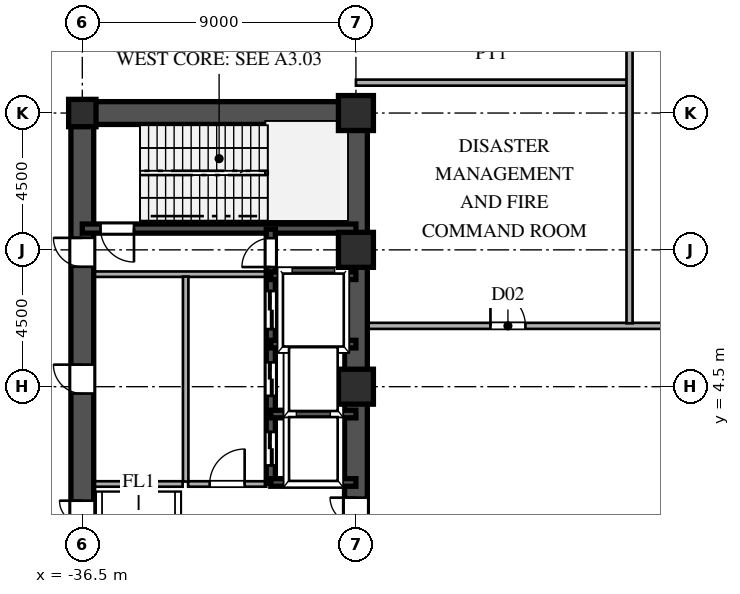
"""IFC4 building model, lengths in metres.
Left out: names, types, materials, properties, quantities, classifications, styles, units other than length and angle.
Written with IfcOpenShell. Run it as: python <this file> out.ifc"""

import sys

from ifc_helpers import new_model, si_unit, direction, frame, frame_2d, origin, origin_2d, place, context, subcontext, project, spatial, rectangle, hollow_rectangle, i_section, extrude, source, transform, mapped, element, fill, save


model = new_model("IFC4")
c1 = context("Model", 3, precision=1e-05, world=origin(), true_north=direction((0.0, 1.0)))
c2 = subcontext(c1, "Body", "Model", "MODEL_VIEW")
j1 = project(units=[si_unit("LENGTHUNIT", "METRE"), si_unit("PLANEANGLEUNIT", "RADIAN")], contexts=[c1])
p1 = place(None, origin())
s1 = spatial("IfcSite", under=j1, at=p1, CompositionType="ELEMENT")
p2 = place(p1, origin())
s2 = spatial("IfcBuilding", under=s1, at=p2, CompositionType="ELEMENT")
p3 = place(p2, origin())
s3 = spatial("IfcBuildingStorey", under=s2, at=p3, CompositionType="ELEMENT", Elevation=0.0)
m1 = source(origin(), c2, "Body", "SweptSolid", [
    extrude(hollow_rectangle(XDim=1.15, YDim=1.15, WallThickness=0.048, at=origin_2d()), origin(), (0.0, 0.0, 1.0), 5.4),
])
for number, where, z_axis, x_axis in (
    (1, (-27.5, 4.5, 0.0), (0.0, 0.0, 1.0), (1.0, 0.0, 0.0)),
    (2, (-27.5, 9.0, 0.0), (0.0, 0.0, 1.0), (1.0, 0.0, 0.0)),
    (3, (-27.5, 13.5, 0.0), (0.0, 0.0, 1.0), (1.0, 0.0, 0.0)),
):
    element("IfcColumn", number, at=place(p3, frame(where, z_axis=z_axis, x_axis=x_axis)), inside=s3, PredefinedType="COLUMN", context=c2, shape_type="MappedRepresentation", body=[
        mapped(m1, transform((0.0, 0.0, 0.0), scale=1.0)),
    ])
m2 = source(origin(), c2, "Body", "SweptSolid", [
    extrude(i_section(OverallWidth=0.9, OverallDepth=0.9, WebThickness=0.036, FlangeThickness=0.055, at=origin_2d()), origin(), (0.0, 0.0, 1.0), 5.4),
])
p4 = place(p3, frame((-36.5, 13.5, 0.0), z_axis=(0.0, 0.0, 1.0), x_axis=(1.0, 0.0, 0.0)))
e4 = element("IfcColumn", 4, at=p4, inside=s3, PredefinedType="COLUMN", context=c2, shape_type="MappedRepresentation", body=[
    mapped(m2, transform((0.0, 0.0, 0.0), scale=1.0)),
])
p5 = place(p3, frame((-27.5, 1.3, 0.0), z_axis=(0.0, 0.0, 1.0), x_axis=(0.0, 1.0, 0.0)))
e5 = element("IfcWall", 5, at=p5, inside=s3, PredefinedType="SHEAR", context=c2, shape_type="SweptSolid", body=[
    extrude(rectangle(XDim=12.2, YDim=0.75, at=frame_2d((6.1, 0.0))), origin(), (0.0, 0.0, 1.0), 5.12),
])
p6 = place(p3, frame((-27.5, -1.3, 0.0), z_axis=(0.0, 0.0, 1.0), x_axis=(0.0, 1.0, 0.0)))
e6 = element("IfcWall", 6, at=p6, inside=s3, PredefinedType="SHEAR", context=c2, shape_type="SweptSolid", body=[
    extrude(rectangle(XDim=2.6, YDim=0.75, at=frame_2d((1.3, 0.0))), origin(), (0.0, 0.0, 1.0), 5.12),
])
p7 = place(p6, frame((0.45, 0.0, 0.0)))
e7 = element("IfcOpeningElement", 7, at=p7, cuts=e6, PredefinedType="OPENING", context=c2, shape_type="SweptSolid", body=[
    extrude(rectangle(XDim=1.7, YDim=2.35, at=frame_2d((0.85, 1.175))), frame((0.0, 0.385, 0.0), z_axis=(0.0, -1.0, 0.0), x_axis=(1.0, 0.0, 0.0)), (0.0, 0.0, 1.0), 0.77),
])
p8 = place(p3, frame((-36.5, 13.5, 0.0), z_axis=(0.0, 0.0, 1.0), x_axis=(1.0, 0.0, 0.0)))
e8 = element("IfcWall", 8, at=p8, inside=s3, PredefinedType="SHEAR", context=c2, shape_type="SweptSolid", body=[
    extrude(rectangle(XDim=9.0, YDim=0.75, at=frame_2d((4.5, 0.0))), origin(), (0.0, 0.0, 1.0), 5.12),
])
p9 = place(p3, frame((-36.5, -1.3, 0.0), z_axis=(0.0, 0.0, 1.0), x_axis=(0.0, 1.0, 0.0)))
e9 = element("IfcWall", 9, at=p9, inside=s3, PredefinedType="SHEAR", context=c2, shape_type="SweptSolid", body=[
    extrude(rectangle(XDim=2.6, YDim=0.75, at=frame_2d((1.3, 0.0))), origin(), (0.0, 0.0, 1.0), 5.12),
])
p10 = place(p9, frame((0.55, 0.0, 0.0)))
e10 = element("IfcOpeningElement", 10, at=p10, cuts=e9, PredefinedType="OPENING", context=c2, shape_type="SweptSolid", body=[
    extrude(rectangle(XDim=1.5, YDim=2.3, at=frame_2d((0.75, 1.15))), frame((0.0, 0.385, 0.0), z_axis=(0.0, -1.0, 0.0), x_axis=(1.0, 0.0, 0.0)), (0.0, 0.0, 1.0), 0.77),
])
p11 = place(p3, frame((-36.5, 8.2, 0.0), z_axis=(0.0, 0.0, 1.0), x_axis=(0.0, 1.0, 0.0)))
e11 = element("IfcWall", 11, at=p11, inside=s3, PredefinedType="SHEAR", context=c2, shape_type="SweptSolid", body=[
    extrude(rectangle(XDim=5.45, YDim=0.75, at=frame_2d((2.725, 0.0))), origin(), (0.0, 0.0, 1.0), 5.12),
])
p12 = place(p11, frame((0.245, 0.0, 0.0)))
e12 = element("IfcOpeningElement", 12, at=p12, cuts=e11, PredefinedType="OPENING", context=c2, shape_type="SweptSolid", body=[
    extrude(rectangle(XDim=0.95, YDim=2.15, at=frame_2d((0.475, 1.075))), frame((0.0, 0.385, 0.0), z_axis=(0.0, -1.0, 0.0), x_axis=(1.0, 0.0, 0.0)), (0.0, 0.0, 1.0), 0.77),
])
p13 = place(p3, frame((-36.5, 1.3, 0.0), z_axis=(0.0, 0.0, 1.0), x_axis=(0.0, 1.0, 0.0)))
e13 = element("IfcWall", 13, at=p13, inside=s3, PredefinedType="SHEAR", context=c2, shape_type="SweptSolid", body=[
    extrude(rectangle(XDim=6.9, YDim=0.75, at=frame_2d((3.45, 0.0))), origin(), (0.0, 0.0, 1.0), 5.12),
])
p14 = place(p13, frame((2.975, 0.0, 0.0)))
e14 = element("IfcOpeningElement", 14, at=p14, cuts=e13, PredefinedType="OPENING", context=c2, shape_type="SweptSolid", body=[
    extrude(rectangle(XDim=0.95, YDim=2.15, at=frame_2d((0.475, 1.075))), frame((0.0, 0.385, 0.0), z_axis=(0.0, -1.0, 0.0), x_axis=(1.0, 0.0, 0.0)), (0.0, 0.0, 1.0), 0.77),
])
p15 = place(p3, frame((-36.5, 9.7, 0.0), z_axis=(0.0, 0.0, 1.0), x_axis=(1.0, 0.0, 0.0)))
e15 = element("IfcWall", 15, at=p15, inside=s3, PredefinedType="SHEAR", context=c2, shape_type="SweptSolid", body=[
    extrude(rectangle(XDim=9.0, YDim=0.3, at=frame_2d((4.5, 0.0))), origin(), (0.0, 0.0, 1.0), 5.12),
])
p16 = place(p15, frame((0.6, 0.0, 0.0)))
e16 = element("IfcOpeningElement", 16, at=p16, cuts=e15, PredefinedType="OPENING", context=c2, shape_type="SweptSolid", body=[
    extrude(rectangle(XDim=1.1, YDim=2.2, at=frame_2d((0.55, 1.1))), frame((0.0, 0.16, 0.0), z_axis=(0.0, -1.0, 0.0), x_axis=(1.0, 0.0, 0.0)), (0.0, 0.0, 1.0), 0.32),
])
for number, where, z_axis, x_axis in (
    (17, (-30.3, 1.35, 0.0), (0.0, 0.0, 1.0), (1.0, 0.0, 0.0)),
    (18, (-30.3, 3.6, 0.0), (0.0, 0.0, 1.0), (1.0, 0.0, 0.0)),
    (19, (-30.3, 5.9, 0.0), (0.0, 0.0, 1.0), (1.0, 0.0, 0.0)),
    (20, (-30.3, 8.15, 0.0), (0.0, 0.0, 1.0), (1.0, 0.0, 0.0)),
):
    element("IfcWall", number, at=place(p3, frame(where, z_axis=z_axis, x_axis=x_axis)), inside=s3, PredefinedType="SHEAR", context=c2, shape_type="SweptSolid", body=[
        extrude(rectangle(XDim=2.8, YDim=0.25, at=frame_2d((1.4, 0.0))), origin(), (0.0, 0.0, 1.0), 5.12),
    ])
p17 = place(p3, frame((-30.3, 1.32, 0.0), z_axis=(0.0, 0.0, 1.0), x_axis=(0.0, 1.0, 0.0)))
e21 = element("IfcWall", 21, at=p17, inside=s3, PredefinedType="SHEAR", context=c2, shape_type="SweptSolid", body=[
    extrude(rectangle(XDim=2.28, YDim=0.3, at=frame_2d((1.14, 0.0))), origin(), (0.0, 0.0, 1.0), 5.12),
])
p18 = place(p17, frame((0.59, 0.0, 0.0)))
e22 = element("IfcOpeningElement", 22, at=p18, cuts=e21, PredefinedType="OPENING", context=c2, shape_type="SweptSolid", body=[
    extrude(rectangle(XDim=1.1, YDim=2.2, at=frame_2d((0.55, 1.1))), frame((0.0, 0.16, 0.0), z_axis=(0.0, -1.0, 0.0), x_axis=(1.0, 0.0, 0.0)), (0.0, 0.0, 1.0), 0.32),
])
p19 = place(p3, frame((-30.3, 3.6, 0.0), z_axis=(0.0, 0.0, 1.0), x_axis=(0.0, 1.0, 0.0)))
e23 = element("IfcWall", 23, at=p19, inside=s3, PredefinedType="SHEAR", context=c2, shape_type="SweptSolid", body=[
    extrude(rectangle(XDim=2.3, YDim=0.3, at=frame_2d((1.15, 0.0))), origin(), (0.0, 0.0, 1.0), 5.12),
])
p20 = place(p19, frame((0.6, 0.0, 0.0)))
e24 = element("IfcOpeningElement", 24, at=p20, cuts=e23, PredefinedType="OPENING", context=c2, shape_type="SweptSolid", body=[
    extrude(rectangle(XDim=1.1, YDim=2.2, at=frame_2d((0.55, 1.1))), frame((0.0, 0.16, 0.0), z_axis=(0.0, -1.0, 0.0), x_axis=(1.0, 0.0, 0.0)), (0.0, 0.0, 1.0), 0.32),
])
p21 = place(p3, frame((-30.3, 5.9, 0.0), z_axis=(0.0, 0.0, 1.0), x_axis=(0.0, 1.0, 0.0)))
e25 = element("IfcWall", 25, at=p21, inside=s3, PredefinedType="SHEAR", context=c2, shape_type="SweptSolid", body=[
    extrude(rectangle(XDim=2.25, YDim=0.3, at=frame_2d((1.125, 0.0))), origin(), (0.0, 0.0, 1.0), 5.12),
])
p22 = place(p21, frame((0.495, 0.0, 0.0)))
e26 = element("IfcOpeningElement", 26, at=p22, cuts=e25, PredefinedType="OPENING", context=c2, shape_type="SweptSolid", body=[
    extrude(rectangle(XDim=1.25, YDim=2.3, at=frame_2d((0.625, 1.15))), frame((0.0, 0.16, 0.0), z_axis=(0.0, -1.0, 0.0), x_axis=(1.0, 0.0, 0.0)), (0.0, 0.0, 1.0), 0.32),
])
p23 = place(p3, frame((-30.3, 8.15, 0.0), z_axis=(0.0, 0.0, 1.0), x_axis=(0.0, 1.0, 0.0)))
e27 = element("IfcWall", 27, at=p23, inside=s3, PredefinedType="SHEAR", context=c2, shape_type="SweptSolid", body=[
    extrude(rectangle(XDim=1.53, YDim=0.3, at=frame_2d((0.765, 0.0))), origin(), (0.0, 0.0, 1.0), 5.12),
])
p24 = place(p23, frame((0.285, 0.0, 0.0)))
e28 = element("IfcOpeningElement", 28, at=p24, cuts=e27, PredefinedType="OPENING", context=c2, shape_type="SweptSolid", body=[
    extrude(rectangle(XDim=0.95, YDim=2.15, at=frame_2d((0.475, 1.075))), frame((0.0, 0.16, 0.0), z_axis=(0.0, -1.0, 0.0), x_axis=(1.0, 0.0, 0.0)), (0.0, 0.0, 1.0), 0.32),
])
p25 = place(p3, frame((-36.15, 8.2, 0.0), z_axis=(0.0, 0.0, 1.0), x_axis=(1.0, 0.0, 0.0)))
e29 = element("IfcWall", 29, at=p25, inside=s3, PredefinedType="PARTITIONING", context=c2, shape_type="SweptSolid", body=[
    extrude(rectangle(XDim=5.7, YDim=0.18, at=frame_2d((2.85, 0.0))), origin(), (0.0, 0.0, 1.0), 5.12),
])
p26 = place(p3, frame((-33.1, 1.38, 0.0), z_axis=(0.0, 0.0, 1.0), x_axis=(0.0, 1.0, 0.0)))
e30 = element("IfcWall", 30, at=p26, inside=s3, PredefinedType="PARTITIONING", context=c2, shape_type="SweptSolid", body=[
    extrude(rectangle(XDim=6.74, YDim=0.18, at=frame_2d((3.37, 0.0))), origin(), (0.0, 0.0, 1.0), 5.12),
])
p27 = place(p3, frame((-33.02, 1.3, 0.0), z_axis=(0.0, 0.0, 1.0), x_axis=(1.0, 0.0, 0.0)))
e31 = element("IfcWall", 31, at=p27, inside=s3, PredefinedType="PARTITIONING", context=c2, shape_type="SweptSolid", body=[
    extrude(rectangle(XDim=2.57, YDim=0.18, at=frame_2d((1.285, 0.0))), origin(), (0.0, 0.0, 1.0), 5.12),
])
p28 = place(p27, frame((0.71, 0.0, 0.0)))
e32 = element("IfcOpeningElement", 32, at=p28, cuts=e31, PredefinedType="OPENING", context=c2, shape_type="SweptSolid", body=[
    extrude(rectangle(XDim=1.15, YDim=2.2, at=frame_2d((0.575, 1.1))), frame((0.0, 0.1, 0.0), z_axis=(0.0, -1.0, 0.0), x_axis=(1.0, 0.0, 0.0)), (0.0, 0.0, 1.0), 0.2),
])
p29 = place(p3, frame((-36.15, 1.3, 0.0), z_axis=(0.0, 0.0, 1.0), x_axis=(1.0, 0.0, 0.0)))
e33 = element("IfcWall", 33, at=p29, inside=s3, PredefinedType="PARTITIONING", context=c2, shape_type="SweptSolid", body=[
    extrude(rectangle(XDim=2.95, YDim=0.18, at=frame_2d((1.475, 0.0))), origin(), (0.0, 0.0, 1.0), 5.12),
])
p30 = place(p3, frame((-27.12, 6.5, 0.0), z_axis=(0.0, 0.0, 1.0), x_axis=(1.0, 0.0, 0.0)))
e34 = element("IfcWall", 34, at=p30, inside=s3, PredefinedType="PARTITIONING", context=c2, shape_type="SweptSolid", body=[
    extrude(rectangle(XDim=54.24, YDim=0.2, at=frame_2d((27.12, 0.0))), origin(), (0.0, 0.0, 1.0), 5.12),
])
p31 = place(p30, frame((4.045, 0.0, 0.0)))
e35 = element("IfcOpeningElement", 35, at=p31, cuts=e34, PredefinedType="OPENING", context=c2, shape_type="SweptSolid", body=[
    extrude(rectangle(XDim=1.15, YDim=2.2, at=frame_2d((0.575, 1.1))), frame((0.0, 0.11, 0.0), z_axis=(0.0, -1.0, 0.0), x_axis=(1.0, 0.0, 0.0)), (0.0, 0.0, 1.0), 0.22),
])
p32 = place(p30, frame((17.395, 0.0, 0.0)))
e36 = element("IfcOpeningElement", 36, at=p32, cuts=e34, PredefinedType="OPENING", context=c2, shape_type="SweptSolid", body=[
    extrude(rectangle(XDim=0.95, YDim=2.15, at=frame_2d((0.475, 1.075))), frame((0.0, 0.11, 0.0), z_axis=(0.0, -1.0, 0.0), x_axis=(1.0, 0.0, 0.0)), (0.0, 0.0, 1.0), 0.22),
])
p33 = place(p30, frame((47.33, 0.0, 0.0)))
e37 = element("IfcOpeningElement", 37, at=p33, cuts=e34, PredefinedType="OPENING", context=c2, shape_type="SweptSolid", body=[
    extrude(rectangle(XDim=0.88, YDim=2.1, at=frame_2d((0.44, 1.05))), frame((0.0, 0.11, 0.0), z_axis=(0.0, -1.0, 0.0), x_axis=(1.0, 0.0, 0.0)), (0.0, 0.0, 1.0), 0.22),
])
p34 = place(p30, frame((51.68, 0.0, 0.0)))
e38 = element("IfcOpeningElement", 38, at=p34, cuts=e34, PredefinedType="OPENING", context=c2, shape_type="SweptSolid", body=[
    extrude(rectangle(XDim=0.88, YDim=2.1, at=frame_2d((0.44, 1.05))), frame((0.0, 0.11, 0.0), z_axis=(0.0, -1.0, 0.0), x_axis=(1.0, 0.0, 0.0)), (0.0, 0.0, 1.0), 0.22),
])
p35 = place(p3, frame((-27.5, 14.5, 0.0), z_axis=(0.0, 0.0, 1.0), x_axis=(1.0, 0.0, 0.0)))
e39 = element("IfcWall", 39, at=p35, inside=s3, PredefinedType="PARTITIONING", context=c2, shape_type="SweptSolid", body=[
    extrude(rectangle(XDim=8.915, YDim=0.2, at=frame_2d((4.458, 0.0))), origin(), (0.0, 0.0, 1.0), 5.12),
])
p36 = place(p3, frame((-18.5, 6.585, 0.0), z_axis=(0.0, 0.0, 1.0), x_axis=(0.0, 1.0, 0.0)))
e40 = element("IfcWall", 40, at=p36, inside=s3, PredefinedType="PARTITIONING", context=c2, shape_type="SweptSolid", body=[
    extrude(rectangle(XDim=25.215, YDim=0.2, at=frame_2d((12.607, 0.0))), origin(), (0.0, 0.0, 1.0), 5.12),
])
m3 = source(origin(), c2, "Body", "SweptSolid", [
    extrude(rectangle(XDim=1.7, YDim=2.35, at=frame_2d((0.85, 1.175))), frame((0.0, 0.025, 0.0), z_axis=(0.0, -1.0, 0.0), x_axis=(1.0, 0.0, 0.0)), (0.0, 0.0, 1.0), 0.05),
])
p37 = place(p7, origin())
e41 = element("IfcDoor", 41, at=p37, inside=s3, OperationType="DOUBLE_SWING_LEFT", PredefinedType="DOOR", context=c2, shape_type="MappedRepresentation", body=[
    mapped(m3, transform((0.0, 0.0, 0.0), scale=1.0)),
])
fill(e7, e41)
m4 = source(origin(), c2, "Body", "SweptSolid", [
    extrude(rectangle(XDim=1.5, YDim=2.3, at=frame_2d((0.75, 1.15))), frame((0.0, 0.025, 0.0), z_axis=(0.0, -1.0, 0.0), x_axis=(1.0, 0.0, 0.0)), (0.0, 0.0, 1.0), 0.05),
])
p38 = place(p10, origin())
e42 = element("IfcDoor", 42, at=p38, inside=s3, OperationType="DOUBLE_SWING_LEFT", PredefinedType="DOOR", context=c2, shape_type="MappedRepresentation", body=[
    mapped(m4, transform((0.0, 0.0, 0.0), scale=1.0)),
])
fill(e10, e42)
m5 = source(origin(), c2, "Body", "SweptSolid", [
    extrude(rectangle(XDim=0.95, YDim=2.15, at=frame_2d((0.475, 1.075))), frame((0.0, 0.025, 0.0), z_axis=(0.0, -1.0, 0.0), x_axis=(1.0, 0.0, 0.0)), (0.0, 0.0, 1.0), 0.05),
])
p39 = place(p12, origin())
e43 = element("IfcDoor", 43, at=p39, inside=s3, OperationType="SINGLE_SWING_RIGHT", PredefinedType="DOOR", context=c2, shape_type="MappedRepresentation", body=[
    mapped(m5, transform((0.0, 0.0, 0.0), scale=1.0)),
])
fill(e12, e43)
p40 = place(p14, origin())
e44 = element("IfcDoor", 44, at=p40, inside=s3, OperationType="SINGLE_SWING_RIGHT", PredefinedType="DOOR", context=c2, shape_type="MappedRepresentation", body=[
    mapped(m5, transform((0.0, 0.0, 0.0), scale=1.0)),
])
fill(e14, e44)
m6 = source(origin(), c2, "Body", "SweptSolid", [
    extrude(rectangle(XDim=1.1, YDim=2.2, at=frame_2d((0.55, 1.1))), frame((0.0, 0.025, 0.0), z_axis=(0.0, -1.0, 0.0), x_axis=(1.0, 0.0, 0.0)), (0.0, 0.0, 1.0), 0.05),
])
p41 = place(p16, frame((1.1, 0.0, 0.0), z_axis=(0.0, 0.0, 1.0), x_axis=(-1.0, 0.0, 0.0)))
e45 = element("IfcDoor", 45, at=p41, inside=s3, OperationType="SINGLE_SWING_RIGHT", PredefinedType="DOOR", context=c2, shape_type="MappedRepresentation", body=[
    mapped(m6, transform((0.0, 0.0, 0.0), scale=1.0)),
])
fill(e16, e45)
m7 = source(origin(), c2, "Body", "SweptSolid", [
    extrude(rectangle(XDim=1.1, YDim=2.2, at=frame_2d((0.55, 1.1))), frame((0.0, 0.025, 0.0), z_axis=(0.0, -1.0, 0.0), x_axis=(1.0, 0.0, 0.0)), (0.0, 0.0, 1.0), 0.05),
])
p42 = place(p18, origin())
e46 = element("IfcDoor", 46, at=p42, inside=s3, OperationType="DOUBLE_DOOR_SLIDING", PredefinedType="DOOR", context=c2, shape_type="MappedRepresentation", body=[
    mapped(m7, transform((0.0, 0.0, 0.0), scale=1.0)),
])
fill(e22, e46)
p43 = place(p20, origin())
e47 = element("IfcDoor", 47, at=p43, inside=s3, OperationType="DOUBLE_DOOR_SLIDING", PredefinedType="DOOR", context=c2, shape_type="MappedRepresentation", body=[
    mapped(m7, transform((0.0, 0.0, 0.0), scale=1.0)),
])
fill(e24, e47)
m8 = source(origin(), c2, "Body", "SweptSolid", [
    extrude(rectangle(XDim=1.25, YDim=2.3, at=frame_2d((0.625, 1.15))), frame((0.0, 0.025, 0.0), z_axis=(0.0, -1.0, 0.0), x_axis=(1.0, 0.0, 0.0)), (0.0, 0.0, 1.0), 0.05),
])
p44 = place(p22, origin())
e48 = element("IfcDoor", 48, at=p44, inside=s3, OperationType="DOUBLE_DOOR_SLIDING", PredefinedType="DOOR", context=c2, shape_type="MappedRepresentation", body=[
    mapped(m8, transform((0.0, 0.0, 0.0), scale=1.0)),
])
fill(e26, e48)
p45 = place(p24, origin())
e49 = element("IfcDoor", 49, at=p45, inside=s3, OperationType="SINGLE_SWING_LEFT", PredefinedType="DOOR", context=c2, shape_type="MappedRepresentation", body=[
    mapped(m5, transform((0.0, 0.0, 0.0), scale=1.0)),
])
fill(e28, e49)
m9 = source(origin(), c2, "Body", "SweptSolid", [
    extrude(rectangle(XDim=1.15, YDim=2.2, at=frame_2d((0.575, 1.1))), frame((0.0, 0.025, 0.0), z_axis=(0.0, -1.0, 0.0), x_axis=(1.0, 0.0, 0.0)), (0.0, 0.0, 1.0), 0.05),
])
p46 = place(p28, origin())
e50 = element("IfcDoor", 50, at=p46, inside=s3, OperationType="SINGLE_SWING_RIGHT", PredefinedType="DOOR", context=c2, shape_type="MappedRepresentation", body=[
    mapped(m9, transform((0.0, 0.0, 0.0), scale=1.0)),
])
fill(e32, e50)
p47 = place(p31, origin())
e51 = element("IfcDoor", 51, at=p47, inside=s3, OperationType="SINGLE_SWING_LEFT", PredefinedType="DOOR", context=c2, shape_type="MappedRepresentation", body=[
    mapped(m9, transform((0.0, 0.0, 0.0), scale=1.0)),
])
fill(e35, e51)
save(model, sys.argv[1])
